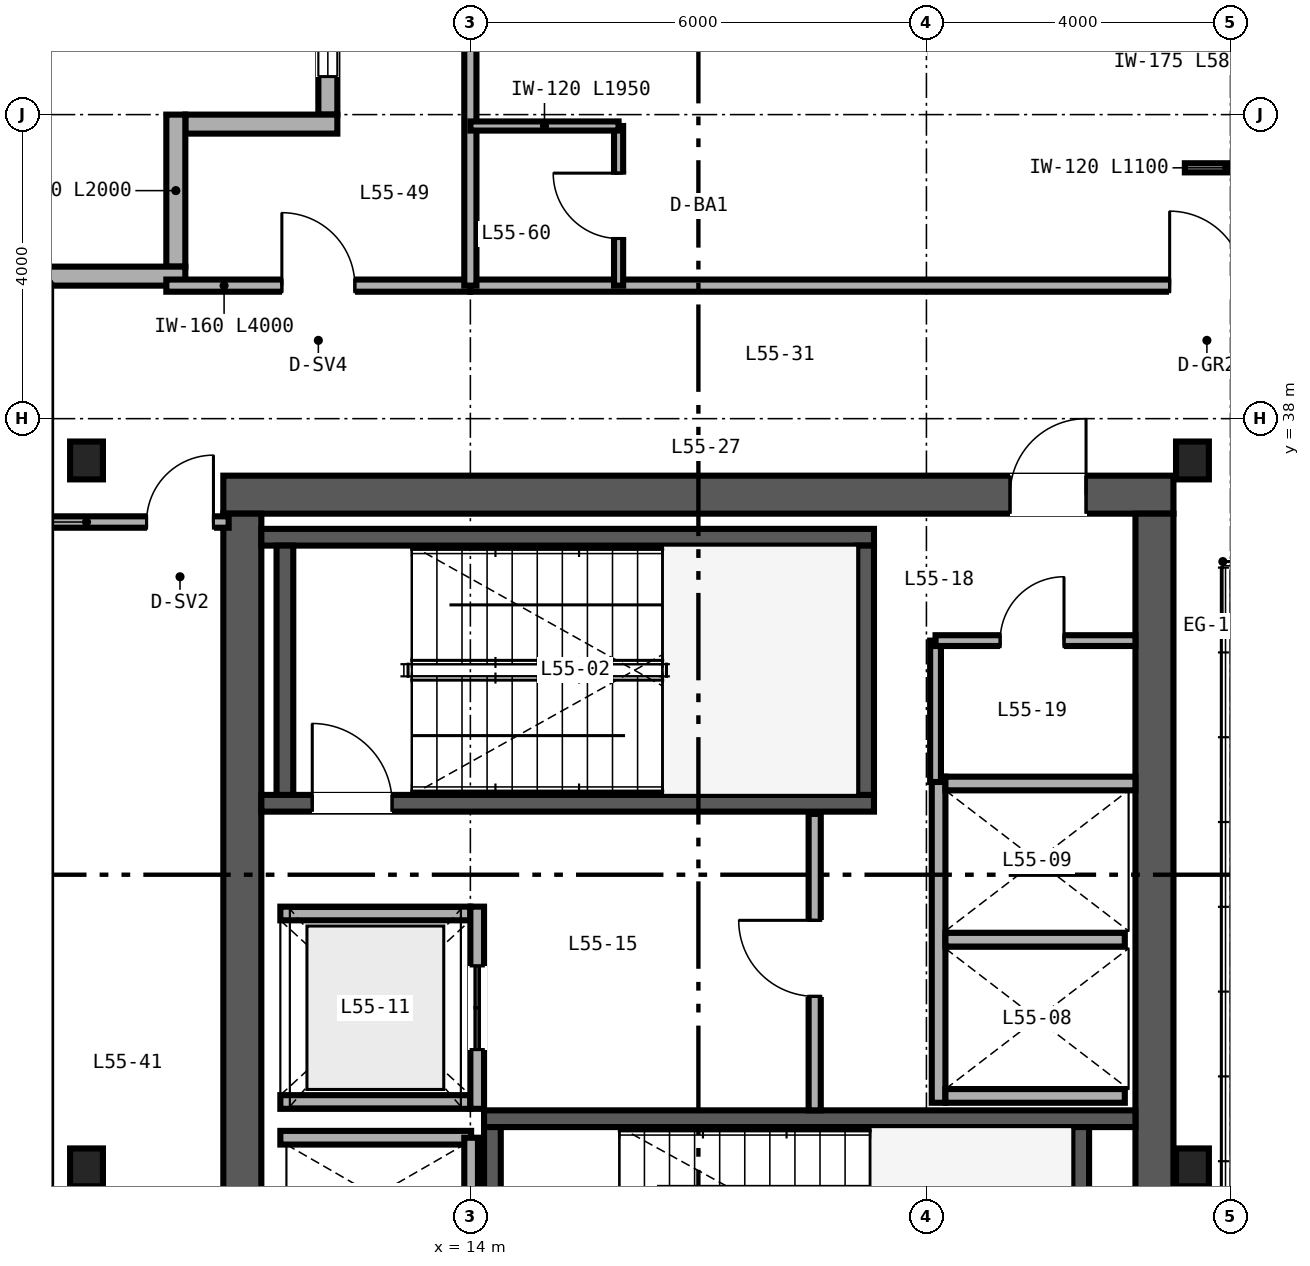
"""IFC4 building model, lengths in metres.
Left out: names, types, materials, properties, quantities, classifications, styles, units other than length and angle.
Written with IfcOpenShell. Run it as: python <this file> out.ifc"""

import sys

from ifc_helpers import new_model, si_unit, direction, frame, frame_2d, origin, origin_2d, place, context, subcontext, project, spatial, rectangle, i_section, extrude, source, transform, mapped, element, fill, save


model = new_model("IFC4")
c1 = context("Model", 3, precision=1e-05, world=origin(), true_north=direction((0.0, 1.0)))
c2 = subcontext(c1, "Body", "Model", "MODEL_VIEW")
j1 = project(units=[si_unit("LENGTHUNIT", "METRE"), si_unit("PLANEANGLEUNIT", "RADIAN")], contexts=[c1])
p1 = place(None, origin())
s1 = spatial("IfcSite", under=j1, at=p1, CompositionType="ELEMENT")
p2 = place(p1, origin())
s2 = spatial("IfcBuilding", under=s1, at=p2, CompositionType="ELEMENT")
p3 = place(p2, frame((0.0, 0.0, 217.2)))
s3 = spatial("IfcBuildingStorey", under=s2, at=p3, CompositionType="ELEMENT", Elevation=217.2)
p4 = place(p3, frame((10.75, 37.0, 0.0), z_axis=(0.0, 0.0, 1.0), x_axis=(1.0, 0.0, 0.0)))
e1 = element("IfcWall", 1, at=p4, inside=s3, PredefinedType="SHEAR", context=c2, shape_type="SweptSolid", body=[
    extrude(rectangle(XDim=12.5, YDim=0.5, at=frame_2d((6.25, 0.0))), origin(), (0.0, 0.0, 1.0), 3.28),
])
p5 = place(p4, frame((10.35, 0.0, 0.0)))
e2 = element("IfcOpeningElement", 2, at=p5, cuts=e1, PredefinedType="OPENING", context=c2, shape_type="SweptSolid", body=[
    extrude(rectangle(XDim=1.0, YDim=2.15, at=frame_2d((0.5, 1.075))), frame((0.0, 0.26, 0.0), z_axis=(0.0, -1.0, 0.0), x_axis=(1.0, 0.0, 0.0)), (0.0, 0.0, 1.0), 0.52),
])
for number, where, z_axis, x_axis in (
    (3, (11.0, 15.25, 0.0), (0.0, 0.0, 1.0), (0.0, 1.0, 0.0)),
    (4, (23.0, 15.25, 0.0), (0.0, 0.0, 1.0), (0.0, 1.0, 0.0)),
):
    element("IfcWall", number, at=place(p3, frame(where, z_axis=z_axis, x_axis=x_axis)), inside=s3, PredefinedType="SHEAR", context=c2, shape_type="SweptSolid", body=[
        extrude(rectangle(XDim=21.5, YDim=0.5, at=frame_2d((10.75, 0.0))), origin(), (0.0, 0.0, 1.0), 3.28),
    ])
p6 = place(p3, frame((11.25, 32.94, 0.0), z_axis=(0.0, 0.0, 1.0), x_axis=(1.0, 0.0, 0.0)))
e5 = element("IfcWall", 5, at=p6, inside=s3, PredefinedType="SHEAR", context=c2, shape_type="SweptSolid", body=[
    extrude(rectangle(XDim=8.06, YDim=0.22, at=frame_2d((4.03, 0.0))), origin(), (0.0, 0.0, 1.0), 3.4),
])
p7 = place(p6, frame((0.67, 0.0, 0.0)))
e6 = element("IfcOpeningElement", 6, at=p7, cuts=e5, PredefinedType="OPENING", context=c2, shape_type="SweptSolid", body=[
    extrude(rectangle(XDim=1.05, YDim=2.15, at=frame_2d((0.525, 1.075))), frame((0.0, 0.12, 0.0), z_axis=(0.0, -1.0, 0.0), x_axis=(1.0, 0.0, 0.0)), (0.0, 0.0, 1.0), 0.24),
])
p8 = place(p3, frame((11.25, 36.44, 0.0), z_axis=(0.0, 0.0, 1.0), x_axis=(1.0, 0.0, 0.0)))
e7 = element("IfcWall", 7, at=p8, inside=s3, PredefinedType="SHEAR", context=c2, shape_type="SweptSolid", body=[
    extrude(rectangle(XDim=8.06, YDim=0.22, at=frame_2d((4.03, 0.0))), origin(), (0.0, 0.0, 1.0), 3.4),
])
for number, where, z_axis, x_axis in (
    (8, (11.56, 33.05, 0.0), (0.0, 0.0, 1.0), (0.0, 1.0, 0.0)),
    (9, (19.2, 33.05, 0.0), (0.0, 0.0, 1.0), (0.0, 1.0, 0.0)),
):
    element("IfcWall", number, at=place(p3, frame(where, z_axis=z_axis, x_axis=x_axis)), inside=s3, PredefinedType="SHEAR", context=c2, shape_type="SweptSolid", body=[
        extrude(rectangle(XDim=3.28, YDim=0.22, at=frame_2d((1.64, 0.0))), origin(), (0.0, 0.0, 1.0), 3.4),
    ])
p9 = place(p3, frame((14.18, 28.79, 0.0), z_axis=(0.0, 0.0, 1.0), x_axis=(1.0, 0.0, 0.0)))
e10 = element("IfcWall", 10, at=p9, inside=s3, PredefinedType="SHEAR", context=c2, shape_type="SweptSolid", body=[
    extrude(rectangle(XDim=8.57, YDim=0.22, at=frame_2d((4.285, 0.0))), origin(), (0.0, 0.0, 1.0), 3.4),
])
for number, where, z_axis, x_axis in (
    (11, (14.29, 25.4, 0.0), (0.0, 0.0, 1.0), (0.0, 1.0, 0.0)),
    (12, (22.03, 25.4, 0.0), (0.0, 0.0, 1.0), (0.0, 1.0, 0.0)),
):
    element("IfcWall", number, at=place(p3, frame(where, z_axis=z_axis, x_axis=x_axis)), inside=s3, PredefinedType="SHEAR", context=c2, shape_type="SweptSolid", body=[
        extrude(rectangle(XDim=3.28, YDim=0.22, at=frame_2d((1.64, 0.0))), origin(), (0.0, 0.0, 1.0), 3.4),
    ])
m1 = source(origin(), c2, "Body", "SweptSolid", [
    extrude(i_section(OverallWidth=0.432, OverallDepth=0.498, WebThickness=0.056, FlangeThickness=0.089, FilletRadius=0.025, at=origin_2d()), origin(), (0.0, 0.0, 1.0), 3.28),
])
for number, where, z_axis, x_axis in (
    (13, (8.95, 28.15, 0.0), (0.0, 0.0, 1.0), (1.0, 0.0, 0.0)),
    (14, (23.5, 28.15, 0.0), (0.0, 0.0, 1.0), (1.0, 0.0, 0.0)),
    (15, (8.95, 37.45, 0.0), (0.0, 0.0, 1.0), (1.0, 0.0, 0.0)),
    (16, (23.5, 37.45, 0.0), (0.0, 0.0, 1.0), (1.0, 0.0, 0.0)),
):
    element("IfcColumn", number, at=place(p3, frame(where, z_axis=z_axis, x_axis=x_axis)), inside=s3, PredefinedType="COLUMN", context=c2, shape_type="MappedRepresentation", body=[
        mapped(m1, transform((0.0, 0.0, 0.0), scale=1.0)),
    ])
p10 = place(p3, frame((12.125, 44.0, 0.0), z_axis=(0.0, 0.0, 1.0), x_axis=(0.0, -1.0, 0.0)))
e17 = element("IfcWall", 17, at=p10, inside=s3, PredefinedType="SOLIDWALL", context=c2, shape_type="SweptSolid", body=[
    extrude(rectangle(XDim=2.0, YDim=0.25, at=frame_2d((1.0, 0.0))), origin(), (0.0, 0.0, 1.0), 3.28),
])
p11 = place(p10, frame((0.5, 0.0, 0.85)))
e18 = element("IfcOpeningElement", 18, at=p11, cuts=e17, PredefinedType="OPENING", context=c2, shape_type="SweptSolid", body=[
    extrude(rectangle(XDim=1.0, YDim=1.9, at=frame_2d((0.5, 0.95))), frame((0.0, 0.135, 0.0), z_axis=(0.0, -1.0, 0.0), x_axis=(1.0, 0.0, 0.0)), (0.0, 0.0, 1.0), 0.27),
])
for number, where, z_axis, x_axis in (
    (19, (12.25, 41.875, 0.0), (0.0, 0.0, 1.0), (-1.0, 0.0, 0.0)),
    (20, (10.125, 42.0, 0.0), (0.0, 0.0, 1.0), (0.0, -1.0, 0.0)),
):
    element("IfcWall", number, at=place(p3, frame(where, z_axis=z_axis, x_axis=x_axis)), inside=s3, PredefinedType="SOLIDWALL", context=c2, shape_type="SweptSolid", body=[
        extrude(rectangle(XDim=2.0, YDim=0.25, at=frame_2d((1.0, 0.0))), origin(), (0.0, 0.0, 1.0), 3.28),
    ])
p12 = place(p3, frame((10.25, 39.875, 0.0), z_axis=(0.0, 0.0, 1.0), x_axis=(-1.0, 0.0, 0.0)))
e21 = element("IfcWall", 21, at=p12, inside=s3, PredefinedType="SOLIDWALL", context=c2, shape_type="SweptSolid", body=[
    extrude(rectangle(XDim=2.25, YDim=0.25, at=frame_2d((1.125, 0.0))), origin(), (0.0, 0.0, 1.0), 3.28),
])
p13 = place(p3, frame((20.16, 29.0, 0.0), z_axis=(0.0, 0.0, 1.0), x_axis=(0.0, 1.0, 0.0)))
e22 = element("IfcWall", 22, at=p13, inside=s3, PredefinedType="SOLIDWALL", context=c2, shape_type="SweptSolid", body=[
    extrude(rectangle(XDim=4.29, YDim=0.18, at=frame_2d((2.145, 0.0))), origin(), (0.0, 0.0, 1.0), 3.28),
])
p14 = place(p3, frame((20.25, 29.09, 0.0), z_axis=(0.0, 0.0, 1.0), x_axis=(1.0, 0.0, 0.0)))
e23 = element("IfcWall", 23, at=p14, inside=s3, PredefinedType="SOLIDWALL", context=c2, shape_type="SweptSolid", body=[
    extrude(rectangle(XDim=2.36, YDim=0.18, at=frame_2d((1.18, 0.0))), origin(), (0.0, 0.0, 1.0), 3.28),
])
p15 = place(p3, frame((20.25, 33.2, 0.0), z_axis=(0.0, 0.0, 1.0), x_axis=(1.0, 0.0, 0.0)))
e24 = element("IfcWall", 24, at=p15, inside=s3, PredefinedType="SOLIDWALL", context=c2, shape_type="SweptSolid", body=[
    extrude(rectangle(XDim=2.5, YDim=0.18, at=frame_2d((1.25, 0.0))), origin(), (0.0, 0.0, 1.0), 3.28),
])
p16 = place(p3, frame((20.25, 31.145, 0.0), z_axis=(0.0, 0.0, 1.0), x_axis=(1.0, 0.0, 0.0)))
e25 = element("IfcWall", 25, at=p16, inside=s3, PredefinedType="SOLIDWALL", context=c2, shape_type="SweptSolid", body=[
    extrude(rectangle(XDim=2.36, YDim=0.18, at=frame_2d((1.18, 0.0))), origin(), (0.0, 0.0, 1.0), 3.28),
])
for number, where, z_axis, x_axis in (
    (26, (11.5, 29.01, 0.0), (0.0, 0.0, 1.0), (1.0, 0.0, 0.0)),
    (27, (11.5, 31.49, 0.0), (0.0, 0.0, 1.0), (1.0, 0.0, 0.0)),
):
    element("IfcWall", number, at=place(p3, frame(where, z_axis=z_axis, x_axis=x_axis)), inside=s3, PredefinedType="SOLIDWALL", context=c2, shape_type="SweptSolid", body=[
        extrude(rectangle(XDim=2.5, YDim=0.18, at=frame_2d((1.25, 0.0))), origin(), (0.0, 0.0, 1.0), 3.28),
    ])
p17 = place(p3, frame((14.09, 28.92, 0.0), z_axis=(0.0, 0.0, 1.0), x_axis=(0.0, 1.0, 0.0)))
e28 = element("IfcWall", 28, at=p17, inside=s3, PredefinedType="SOLIDWALL", context=c2, shape_type="SweptSolid", body=[
    extrude(rectangle(XDim=2.66, YDim=0.18, at=frame_2d((1.33, 0.0))), origin(), (0.0, 0.0, 1.0), 3.28),
])
p18 = place(p17, frame((0.78, 0.0, 0.0)))
e29 = element("IfcOpeningElement", 29, at=p18, cuts=e28, PredefinedType="OPENING", context=c2, shape_type="SweptSolid", body=[
    extrude(rectangle(XDim=1.1, YDim=2.2, at=frame_2d((0.55, 1.1))), frame((0.0, 0.1, 0.0), z_axis=(0.0, -1.0, 0.0), x_axis=(1.0, 0.0, 0.0)), (0.0, 0.0, 1.0), 0.2),
])
p19 = place(p3, frame((11.5, 28.54, 0.0), z_axis=(0.0, 0.0, 1.0), x_axis=(1.0, 0.0, 0.0)))
e30 = element("IfcWall", 30, at=p19, inside=s3, PredefinedType="SOLIDWALL", context=c2, shape_type="SweptSolid", body=[
    extrude(rectangle(XDim=2.51, YDim=0.18, at=frame_2d((1.255, 0.0))), origin(), (0.0, 0.0, 1.0), 3.28),
])
p20 = place(p3, frame((14.01, 25.46, 0.0), z_axis=(0.0, 0.0, 1.0), x_axis=(0.0, 1.0, 0.0)))
e31 = element("IfcWall", 31, at=p20, inside=s3, PredefinedType="SOLIDWALL", context=c2, shape_type="SweptSolid", body=[
    extrude(rectangle(XDim=3.08, YDim=0.18, at=frame_2d((1.54, 0.0))), origin(), (0.0, 0.0, 1.0), 3.28),
])
p21 = place(p3, frame((18.53, 28.9, 0.0), z_axis=(0.0, 0.0, 1.0), x_axis=(0.0, 1.0, 0.0)))
e32 = element("IfcWall", 32, at=p21, inside=s3, PredefinedType="PARTITIONING", context=c2, shape_type="SweptSolid", body=[
    extrude(rectangle(XDim=3.9, YDim=0.16, at=frame_2d((1.95, 0.0))), origin(), (0.0, 0.0, 1.0), 3.28),
])
p22 = place(p21, frame((1.5, 0.0, 0.0)))
e33 = element("IfcOpeningElement", 33, at=p22, cuts=e32, PredefinedType="OPENING", context=c2, shape_type="SweptSolid", body=[
    extrude(rectangle(XDim=1.0, YDim=2.15, at=frame_2d((0.5, 1.075))), frame((0.0, 0.09, 0.0), z_axis=(0.0, -1.0, 0.0), x_axis=(1.0, 0.0, 0.0)), (0.0, 0.0, 1.0), 0.18),
])
p23 = place(p3, frame((20.12, 33.22, 0.0), z_axis=(0.0, 0.0, 1.0), x_axis=(0.0, 1.0, 0.0)))
e34 = element("IfcWall", 34, at=p23, inside=s3, PredefinedType="PARTITIONING", context=c2, shape_type="SweptSolid", body=[
    extrude(rectangle(XDim=1.86, YDim=0.142, at=frame_2d((0.93, 0.0))), origin(), (0.0, 0.0, 1.0), 3.28),
])
p24 = place(p3, frame((20.12, 35.08, 0.0), z_axis=(0.0, 0.0, 1.0), x_axis=(1.0, 0.0, 0.0)))
e35 = element("IfcWall", 35, at=p24, inside=s3, PredefinedType="PARTITIONING", context=c2, shape_type="SweptSolid", body=[
    extrude(rectangle(XDim=2.63, YDim=0.142, at=frame_2d((1.315, 0.0))), origin(), (0.0, 0.0, 1.0), 3.28),
])
p25 = place(p24, frame((0.85, 0.0, 0.0)))
e36 = element("IfcOpeningElement", 36, at=p25, cuts=e35, PredefinedType="OPENING", context=c2, shape_type="SweptSolid", body=[
    extrude(rectangle(XDim=0.84, YDim=2.1, at=frame_2d((0.42, 1.05))), frame((0.0, 0.081, 0.0), z_axis=(0.0, -1.0, 0.0), x_axis=(1.0, 0.0, 0.0)), (0.0, 0.0, 1.0), 0.162),
])
p26 = place(p3, frame((8.16, 36.64, 0.0), z_axis=(0.0, 0.0, 1.0), x_axis=(1.0, 0.0, 0.0)))
e37 = element("IfcWall", 37, at=p26, inside=s3, PredefinedType="PARTITIONING", context=c2, shape_type="SweptSolid", body=[
    extrude(rectangle(XDim=2.66, YDim=0.15, at=frame_2d((1.33, 0.0))), origin(), (0.0, 0.0, 1.0), 2.663),
])
p27 = place(p26, frame((1.58, 0.0, 0.0)))
e38 = element("IfcOpeningElement", 38, at=p27, cuts=e37, PredefinedType="OPENING", context=c2, shape_type="SweptSolid", body=[
    extrude(rectangle(XDim=0.88, YDim=2.15, at=frame_2d((0.44, 1.075))), frame((0.0, 0.085, 0.0), z_axis=(0.0, -1.0, 0.0), x_axis=(1.0, 0.0, 0.0)), (0.0, 0.0, 1.0), 0.17),
])
p28 = place(p3, frame((10.0, 39.75, 0.0), z_axis=(0.0, 0.0, 1.0), x_axis=(1.0, 0.0, 0.0)))
e39 = element("IfcWall", 39, at=p28, inside=s3, PredefinedType="PARTITIONING", context=c2, shape_type="SweptSolid", body=[
    extrude(rectangle(XDim=4.0, YDim=0.16, at=frame_2d((2.0, 0.0))), origin(), (0.0, 0.0, 1.0), 3.28),
])
p29 = place(p28, frame((1.52, 0.0, 0.0)))
e40 = element("IfcOpeningElement", 40, at=p29, cuts=e39, PredefinedType="OPENING", context=c2, shape_type="SweptSolid", body=[
    extrude(rectangle(XDim=0.96, YDim=2.15, at=frame_2d((0.48, 1.075))), frame((0.0, 0.09, 0.0), z_axis=(0.0, -1.0, 0.0), x_axis=(1.0, 0.0, 0.0)), (0.0, 0.0, 1.0), 0.18),
])
p30 = place(p3, frame((14.0, 39.75, 0.0), z_axis=(0.0, 0.0, 1.0), x_axis=(1.0, 0.0, 0.0)))
e41 = element("IfcWall", 41, at=p30, inside=s3, PredefinedType="PARTITIONING", context=c2, shape_type="SweptSolid", body=[
    extrude(rectangle(XDim=36.0, YDim=0.16, at=frame_2d((18.0, 0.0))), origin(), (0.0, 0.0, 1.0), 2.823),
])
p31 = place(p30, frame((9.2, 0.0, 0.0)))
e42 = element("IfcOpeningElement", 42, at=p31, cuts=e41, PredefinedType="OPENING", context=c2, shape_type="SweptSolid", body=[
    extrude(rectangle(XDim=0.98, YDim=2.2, at=frame_2d((0.49, 1.1))), frame((0.0, 0.09, 0.0), z_axis=(0.0, -1.0, 0.0), x_axis=(1.0, 0.0, 0.0)), (0.0, 0.0, 1.0), 0.18),
])
p32 = place(p30, frame((19.2, 0.0, 0.0)))
e43 = element("IfcOpeningElement", 43, at=p32, cuts=e41, PredefinedType="OPENING", context=c2, shape_type="SweptSolid", body=[
    extrude(rectangle(XDim=0.98, YDim=2.2, at=frame_2d((0.49, 1.1))), frame((0.0, 0.09, 0.0), z_axis=(0.0, -1.0, 0.0), x_axis=(1.0, 0.0, 0.0)), (0.0, 0.0, 1.0), 0.18),
])
p33 = place(p30, frame((24.52, 0.0, 0.0)))
e44 = element("IfcOpeningElement", 44, at=p33, cuts=e41, PredefinedType="OPENING", context=c2, shape_type="SweptSolid", body=[
    extrude(rectangle(XDim=0.96, YDim=2.15, at=frame_2d((0.48, 1.075))), frame((0.0, 0.09, 0.0), z_axis=(0.0, -1.0, 0.0), x_axis=(1.0, 0.0, 0.0)), (0.0, 0.0, 1.0), 0.18),
])
p34 = place(p30, frame((34.74, 0.0, 0.0)))
e45 = element("IfcOpeningElement", 45, at=p34, cuts=e41, PredefinedType="OPENING", context=c2, shape_type="SweptSolid", body=[
    extrude(rectangle(XDim=0.94, YDim=2.15, at=frame_2d((0.47, 1.075))), frame((0.0, 0.09, 0.0), z_axis=(0.0, -1.0, 0.0), x_axis=(1.0, 0.0, 0.0)), (0.0, 0.0, 1.0), 0.18),
])
p35 = place(p3, frame((14.0, 39.75, 0.0), z_axis=(0.0, 0.0, 1.0), x_axis=(0.0, 1.0, 0.0)))
e46 = element("IfcWall", 46, at=p35, inside=s3, PredefinedType="PARTITIONING", context=c2, shape_type="SweptSolid", body=[
    extrude(rectangle(XDim=5.89, YDim=0.16, at=frame_2d((2.945, 0.0))), origin(), (0.0, 0.0, 1.0), 2.587),
])
p36 = place(p3, frame((15.95, 39.75, 0.0), z_axis=(0.0, 0.0, 1.0), x_axis=(0.0, 1.0, 0.0)))
e47 = element("IfcWall", 47, at=p36, inside=s3, PredefinedType="PARTITIONING", context=c2, shape_type="SweptSolid", body=[
    extrude(rectangle(XDim=2.1, YDim=0.12, at=frame_2d((1.05, 0.0))), origin(), (0.0, 0.0, 1.0), 3.28),
])
p37 = place(p36, frame((0.62, 0.0, 0.0)))
e48 = element("IfcOpeningElement", 48, at=p37, cuts=e47, PredefinedType="OPENING", context=c2, shape_type="SweptSolid", body=[
    extrude(rectangle(XDim=0.86, YDim=2.1, at=frame_2d((0.43, 1.05))), frame((0.0, 0.07, 0.0), z_axis=(0.0, -1.0, 0.0), x_axis=(1.0, 0.0, 0.0)), (0.0, 0.0, 1.0), 0.14),
])
p38 = place(p3, frame((14.0, 41.85, 0.0), z_axis=(0.0, 0.0, 1.0), x_axis=(1.0, 0.0, 0.0)))
e49 = element("IfcWall", 49, at=p38, inside=s3, PredefinedType="PARTITIONING", context=c2, shape_type="SweptSolid", body=[
    extrude(rectangle(XDim=1.95, YDim=0.12, at=frame_2d((0.975, 0.0))), origin(), (0.0, 0.0, 1.0), 3.28),
])
p39 = place(p3, frame((23.4, 41.3, 0.0), z_axis=(0.0, 0.0, 1.0), x_axis=(1.0, 0.0, 0.0)))
e50 = element("IfcWall", 50, at=p39, inside=s3, PredefinedType="PARTITIONING", context=c2, shape_type="SweptSolid", body=[
    extrude(rectangle(XDim=1.1, YDim=0.12, at=frame_2d((0.55, 0.0))), origin(), (0.0, 0.0, 1.0), 2.823),
])
m2 = source(origin(), c2, "Body", "SweptSolid", [
    extrude(rectangle(XDim=1.0, YDim=1.9, at=frame_2d((0.5, 0.95))), frame((0.0, 0.03, 0.0), z_axis=(0.0, -1.0, 0.0), x_axis=(1.0, 0.0, 0.0)), (0.0, 0.0, 1.0), 0.06),
])
p40 = place(p11, origin())
e51 = element("IfcWindow", 51, at=p40, inside=s3, PartitioningType="SINGLE_PANEL", PredefinedType="WINDOW", context=c2, shape_type="MappedRepresentation", body=[
    mapped(m2, transform((0.0, 0.0, 0.0), scale=1.0)),
])
fill(e18, e51)
m3 = source(origin(), c2, "Body", "SweptSolid", [
    extrude(rectangle(XDim=1.05, YDim=2.15, at=frame_2d((0.525, 1.075))), frame((0.0, 0.025, 0.0), z_axis=(0.0, -1.0, 0.0), x_axis=(1.0, 0.0, 0.0)), (0.0, 0.0, 1.0), 0.05),
])
p41 = place(p7, origin())
e52 = element("IfcDoor", 52, at=p41, inside=s3, OperationType="SINGLE_SWING_LEFT", PredefinedType="DOOR", context=c2, shape_type="MappedRepresentation", body=[
    mapped(m3, transform((0.0, 0.0, 0.0), scale=1.0)),
])
fill(e6, e52)
m4 = source(origin(), c2, "Body", "SweptSolid", [
    extrude(rectangle(XDim=1.1, YDim=2.2, at=frame_2d((0.55, 1.1))), frame((0.0, 0.025, 0.0), z_axis=(0.0, -1.0, 0.0), x_axis=(1.0, 0.0, 0.0)), (0.0, 0.0, 1.0), 0.05),
])
p42 = place(p18, origin())
e53 = element("IfcDoor", 53, at=p42, inside=s3, OperationType="DOUBLE_DOOR_SLIDING", PredefinedType="DOOR", context=c2, shape_type="MappedRepresentation", body=[
    mapped(m4, transform((0.0, 0.0, 0.0), scale=1.0)),
])
fill(e29, e53)
m5 = source(origin(), c2, "Body", "SweptSolid", [
    extrude(rectangle(XDim=1.0, YDim=2.15, at=frame_2d((0.5, 1.075))), frame((0.0, 0.025, 0.0), z_axis=(0.0, -1.0, 0.0), x_axis=(1.0, 0.0, 0.0)), (0.0, 0.0, 1.0), 0.05),
])
p43 = place(p22, origin())
e54 = element("IfcDoor", 54, at=p43, inside=s3, OperationType="SINGLE_SWING_RIGHT", PredefinedType="DOOR", context=c2, shape_type="MappedRepresentation", body=[
    mapped(m5, transform((0.0, 0.0, 0.0), scale=1.0)),
])
fill(e33, e54)
m6 = source(origin(), c2, "Body", "SweptSolid", [
    extrude(rectangle(XDim=0.84, YDim=2.1, at=frame_2d((0.42, 1.05))), frame((0.0, 0.025, 0.0), z_axis=(0.0, -1.0, 0.0), x_axis=(1.0, 0.0, 0.0)), (0.0, 0.0, 1.0), 0.05),
])
p44 = place(p25, origin())
e55 = element("IfcDoor", 55, at=p44, inside=s3, OperationType="SINGLE_SWING_RIGHT", PredefinedType="DOOR", context=c2, shape_type="MappedRepresentation", body=[
    mapped(m6, transform((0.0, 0.0, 0.0), scale=1.0)),
])
fill(e36, e55)
p45 = place(p5, origin())
e56 = element("IfcDoor", 56, at=p45, inside=s3, OperationType="SINGLE_SWING_RIGHT", PredefinedType="DOOR", context=c2, shape_type="MappedRepresentation", body=[
    mapped(m5, transform((0.0, 0.0, 0.0), scale=1.0)),
])
fill(e2, e56)
m7 = source(origin(), c2, "Body", "SweptSolid", [
    extrude(rectangle(XDim=0.88, YDim=2.15, at=frame_2d((0.44, 1.075))), frame((0.0, 0.025, 0.0), z_axis=(0.0, -1.0, 0.0), x_axis=(1.0, 0.0, 0.0)), (0.0, 0.0, 1.0), 0.05),
])
p46 = place(p27, origin())
e57 = element("IfcDoor", 57, at=p46, inside=s3, OperationType="SINGLE_SWING_RIGHT", PredefinedType="DOOR", context=c2, shape_type="MappedRepresentation", body=[
    mapped(m7, transform((0.0, 0.0, 0.0), scale=1.0)),
])
fill(e38, e57)
m8 = source(origin(), c2, "Body", "SweptSolid", [
    extrude(rectangle(XDim=0.96, YDim=2.15, at=frame_2d((0.48, 1.075))), frame((0.0, 0.025, 0.0), z_axis=(0.0, -1.0, 0.0), x_axis=(1.0, 0.0, 0.0)), (0.0, 0.0, 1.0), 0.05),
])
p47 = place(p29, origin())
e58 = element("IfcDoor", 58, at=p47, inside=s3, OperationType="SINGLE_SWING_LEFT", PredefinedType="DOOR", context=c2, shape_type="MappedRepresentation", body=[
    mapped(m8, transform((0.0, 0.0, 0.0), scale=1.0)),
])
fill(e40, e58)
m9 = source(origin(), c2, "Body", "SweptSolid", [
    extrude(rectangle(XDim=0.86, YDim=2.1, at=frame_2d((0.43, 1.05))), frame((0.0, 0.025, 0.0), z_axis=(0.0, -1.0, 0.0), x_axis=(1.0, 0.0, 0.0)), (0.0, 0.0, 1.0), 0.05),
])
p48 = place(p37, origin())
e59 = element("IfcDoor", 59, at=p48, inside=s3, OperationType="SINGLE_SWING_RIGHT", PredefinedType="DOOR", context=c2, shape_type="MappedRepresentation", body=[
    mapped(m9, transform((0.0, 0.0, 0.0), scale=1.0)),
])
fill(e48, e59)
m10 = source(origin(), c2, "Body", "SweptSolid", [
    extrude(rectangle(XDim=0.98, YDim=2.2, at=frame_2d((0.49, 1.1))), frame((0.0, 0.025, 0.0), z_axis=(0.0, -1.0, 0.0), x_axis=(1.0, 0.0, 0.0)), (0.0, 0.0, 1.0), 0.05),
])
p49 = place(p31, origin())
e60 = element("IfcDoor", 60, at=p49, inside=s3, OperationType="SINGLE_SWING_LEFT", PredefinedType="DOOR", context=c2, shape_type="MappedRepresentation", body=[
    mapped(m10, transform((0.0, 0.0, 0.0), scale=1.0)),
])
fill(e42, e60)
save(model, sys.argv[1])
